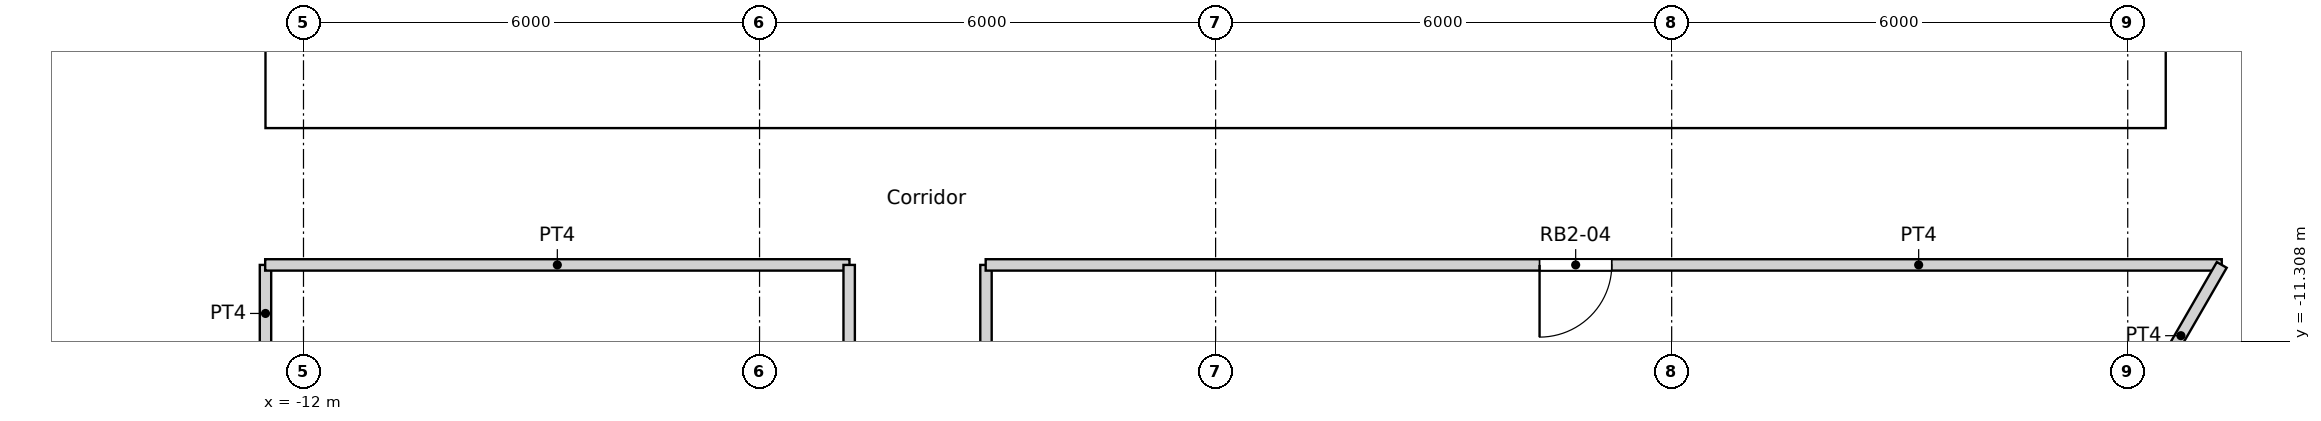
"""IFC4 building model, lengths in metres.
Left out: names, types, materials, properties, quantities, classifications, styles, units other than length and angle.
Written with IfcOpenShell. Run it as: python <this file> out.ifc"""

import sys

from ifc_helpers import new_model, si_unit, direction, frame, frame_2d, origin, place, context, subcontext, project, spatial, rectangle, extrude, element, fill, save


model = new_model("IFC4")
c1 = context("Model", 3, precision=1e-05, world=origin(), true_north=direction((0.0, 1.0)))
c2 = subcontext(c1, "Body", "Model", "MODEL_VIEW")
j1 = project(units=[si_unit("LENGTHUNIT", "METRE"), si_unit("PLANEANGLEUNIT", "RADIAN")], contexts=[c1])
p1 = place(None, origin())
s1 = spatial("IfcSite", under=j1, at=p1, CompositionType="ELEMENT")
p2 = place(p1, origin())
s2 = spatial("IfcBuilding", under=s1, at=p2, CompositionType="ELEMENT")
p3 = place(p2, frame((0.0, 0.0, 136.8)))
s3 = spatial("IfcBuildingStorey", under=s2, at=p3, CompositionType="ELEMENT", Elevation=136.8)
p4 = place(p3, frame((-12.5, -8.05, 0.0), z_axis=(0.0, 0.0, 1.0), x_axis=(1.0, 0.0, 0.0)))
e1 = element("IfcWall", 1, at=p4, inside=s3, PredefinedType="SOLIDWALL", context=c2, shape_type="SweptSolid", body=[
    extrude(rectangle(XDim=25.0, YDim=0.9, at=frame_2d((12.5, 0.0))), origin(), (0.0, 0.0, 1.0), 3.6),
])
p5 = place(p4, frame((13.4, 0.0, 0.0)))
e2 = element("IfcOpeningElement", 2, at=p5, cuts=e1, PredefinedType="OPENING", context=c2, shape_type="SweptSolid", body=[
    extrude(rectangle(XDim=1.0, YDim=2.1, at=frame_2d((0.5, 1.05))), frame((0.0, 0.45, 0.0), z_axis=(0.0, -1.0, 0.0), x_axis=(1.0, 0.0, 0.0)), (0.0, 0.0, 1.0), 0.9),
])
p6 = place(p4, frame((8.3, 0.0, 0.0)))
e3 = element("IfcOpeningElement", 3, at=p6, cuts=e1, PredefinedType="OPENING", context=c2, shape_type="SweptSolid", body=[
    extrude(rectangle(XDim=1.8, YDim=2.1, at=frame_2d((0.9, 1.05))), frame((0.0, 0.45, 0.0), z_axis=(0.0, -1.0, 0.0), x_axis=(1.0, 0.0, 0.0)), (0.0, 0.0, 1.0), 0.9),
])
p7 = place(p4, frame((14.9, 0.0, 0.0)))
e4 = element("IfcOpeningElement", 4, at=p7, cuts=e1, PredefinedType="OPENING", context=c2, shape_type="SweptSolid", body=[
    extrude(rectangle(XDim=1.8, YDim=2.1, at=frame_2d((0.9, 1.05))), frame((0.0, 0.45, 0.0), z_axis=(0.0, -1.0, 0.0), x_axis=(1.0, 0.0, 0.0)), (0.0, 0.0, 1.0), 0.9),
])
p8 = place(p3, frame((-12.05, -7.6, 0.0), z_axis=(0.0, 0.0, 1.0), x_axis=(0.0, 1.0, 0.0)))
e5 = element("IfcWall", 5, at=p8, inside=s3, PredefinedType="SOLIDWALL", context=c2, shape_type="SweptSolid", body=[
    extrude(rectangle(XDim=15.2, YDim=0.9, at=frame_2d((7.6, 0.0))), origin(), (0.0, 0.0, 1.0), 3.6),
])
p9 = place(p8, frame((7.1, 0.0, 0.0)))
e6 = element("IfcOpeningElement", 6, at=p9, cuts=e5, PredefinedType="OPENING", context=c2, shape_type="SweptSolid", body=[
    extrude(rectangle(XDim=1.0, YDim=2.1, at=frame_2d((0.5, 1.05))), frame((0.0, 0.45, 0.0), z_axis=(0.0, -1.0, 0.0), x_axis=(1.0, 0.0, 0.0)), (0.0, 0.0, 1.0), 0.9),
])
p10 = place(p3, frame((12.05, -7.6, 0.0), z_axis=(0.0, 0.0, 1.0), x_axis=(0.0, 1.0, 0.0)))
e7 = element("IfcWall", 7, at=p10, inside=s3, PredefinedType="SOLIDWALL", context=c2, shape_type="SweptSolid", body=[
    extrude(rectangle(XDim=15.2, YDim=0.9, at=frame_2d((7.6, 0.0))), origin(), (0.0, 0.0, 1.0), 3.6),
])
p11 = place(p10, frame((5.1, 0.0, 0.0)))
e8 = element("IfcOpeningElement", 8, at=p11, cuts=e7, PredefinedType="OPENING", context=c2, shape_type="SweptSolid", body=[
    extrude(rectangle(XDim=1.0, YDim=2.1, at=frame_2d((0.5, 1.05))), frame((0.0, 0.45, 0.0), z_axis=(0.0, -1.0, 0.0), x_axis=(1.0, 0.0, 0.0)), (0.0, 0.0, 1.0), 0.9),
])
for number, where, z_axis, x_axis in (
    (9, (0.55, -7.6, 0.0), (0.0, 0.0, 1.0), (0.0, 1.0, 0.0)),
    (10, (2.25, -7.6, 0.0), (0.0, 0.0, 1.0), (0.0, 1.0, 0.0)),
):
    element("IfcWall", number, at=place(p3, frame(where, z_axis=z_axis, x_axis=x_axis)), inside=s3, PredefinedType="SOLIDWALL", context=c2, shape_type="SweptSolid", body=[
        extrude(rectangle(XDim=4.35, YDim=0.3, at=frame_2d((2.175, 0.0))), origin(), (0.0, 0.0, 1.0), 3.3),
    ])
p12 = place(p3, frame((-9.05, -7.15, 0.0), z_axis=(0.0, 0.0, 1.0), x_axis=(1.0, 0.0, 0.0)))
e11 = element("IfcWall", 11, at=p12, inside=s3, PredefinedType="SOLIDWALL", context=c2, shape_type="SweptSolid", body=[
    extrude(rectangle(XDim=4.85, YDim=0.9, at=frame_2d((2.425, 0.0))), origin(), (0.0, 0.0, 1.0), 3.3),
])
p13 = place(p3, frame((-2.4, -7.15, 0.0), z_axis=(0.0, 0.0, 1.0), x_axis=(1.0, 0.0, 0.0)))
e12 = element("IfcWall", 12, at=p13, inside=s3, PredefinedType="SOLIDWALL", context=c2, shape_type="SweptSolid", body=[
    extrude(rectangle(XDim=2.8, YDim=0.9, at=frame_2d((1.4, 0.0))), origin(), (0.0, 0.0, 1.0), 3.3),
])
p14 = place(p3, frame((4.2, -7.15, 0.0), z_axis=(0.0, 0.0, 1.0), x_axis=(1.0, 0.0, 0.0)))
e13 = element("IfcWall", 13, at=p14, inside=s3, PredefinedType="SOLIDWALL", context=c2, shape_type="SweptSolid", body=[
    extrude(rectangle(XDim=4.85, YDim=0.9, at=frame_2d((2.425, 0.0))), origin(), (0.0, 0.0, 1.0), 3.3),
])
p15 = place(p3, frame((-12.504, -10.3, 0.0), z_axis=(0.0, 0.0, 1.0), x_axis=(1.0, 0.0, 0.0)))
e14 = element("IfcWall", 14, at=p15, inside=s3, PredefinedType="PARTITIONING", context=c2, shape_type="SweptSolid", body=[
    extrude(rectangle(XDim=7.687, YDim=0.15, at=frame_2d((3.844, 0.0))), origin(), (0.0, 0.0, 1.0), 3.3),
])
p16 = place(p3, frame((-3.025, -10.3, 0.0), z_axis=(0.0, 0.0, 1.0), x_axis=(1.0, 0.0, 0.0)))
e15 = element("IfcWall", 15, at=p16, inside=s3, PredefinedType="PARTITIONING", context=c2, shape_type="SweptSolid", body=[
    extrude(rectangle(XDim=16.262, YDim=0.15, at=frame_2d((8.131, 0.0))), origin(), (0.0, 0.0, 1.0), 3.3),
])
p17 = place(p16, frame((7.287, 0.0, 0.0)))
e16 = element("IfcOpeningElement", 16, at=p17, cuts=e15, PredefinedType="OPENING", context=c2, shape_type="SweptSolid", body=[
    extrude(rectangle(XDim=0.95, YDim=2.1, at=frame_2d((0.475, 1.05))), frame((0.0, 0.075, 0.0), z_axis=(0.0, -1.0, 0.0), x_axis=(1.0, 0.0, 0.0)), (0.0, 0.0, 1.0), 0.15),
])
p18 = place(p3, frame((12.162, -12.162, 0.0), z_axis=(0.0, 0.0, 1.0), x_axis=(0.499961633463, 0.866047553582, 0.0)))
e17 = element("IfcWall", 17, at=p18, inside=s3, PredefinedType="PARTITIONING", context=c2, shape_type="SweptSolid", body=[
    extrude(rectangle(XDim=2.15, YDim=0.15, at=frame_2d((1.075, 0.0))), origin(), (0.0, 0.0, 1.0), 3.3),
])
p19 = place(p3, frame((-12.5, -11.577, 0.0), z_axis=(0.0, 0.0, 1.0), x_axis=(0.0, 1.0, 0.0)))
e18 = element("IfcWall", 18, at=p19, inside=s3, PredefinedType="PARTITIONING", context=c2, shape_type="SweptSolid", body=[
    extrude(rectangle(XDim=1.277, YDim=0.15, at=frame_2d((0.638, 0.0))), origin(), (0.0, 0.0, 1.0), 3.3),
])
p20 = place(p3, frame((-18.688, -6.802, 0.0), z_axis=(0.0, 0.0, 1.0), x_axis=(0.499914202267, -0.866074933462, 0.0)))
e19 = element("IfcWall", 19, at=p20, inside=s3, PredefinedType="PARTITIONING", context=c2, shape_type="SweptSolid", body=[
    extrude(rectangle(XDim=6.907, YDim=0.15, at=frame_2d((3.454, 0.0))), origin(), (0.0, 0.0, 1.0), 3.3),
])
p21 = place(p20, frame((3.003, 0.0, 0.0)))
e20 = element("IfcOpeningElement", 20, at=p21, cuts=e19, PredefinedType="OPENING", context=c2, shape_type="SweptSolid", body=[
    extrude(rectangle(XDim=1.8, YDim=2.1, at=frame_2d((0.9, 1.05))), frame((0.0, 0.075, 0.0), z_axis=(0.0, -1.0, 0.0), x_axis=(1.0, 0.0, 0.0)), (0.0, 0.0, 1.0), 0.15),
])
p22 = place(p3, frame((-4.821, -16.401, 0.0), z_axis=(0.0, 0.0, 1.0), x_axis=(0.0, 1.0, 0.0)))
e21 = element("IfcWall", 21, at=p22, inside=s3, PredefinedType="PARTITIONING", context=c2, shape_type="SweptSolid", body=[
    extrude(rectangle(XDim=6.101, YDim=0.15, at=frame_2d((3.05, 0.0))), origin(), (0.0, 0.0, 1.0), 3.3),
])
p23 = place(p3, frame((-3.021, -16.614, 0.0), z_axis=(0.0, 0.0, 1.0), x_axis=(0.0, 1.0, 0.0)))
e22 = element("IfcWall", 22, at=p23, inside=s3, PredefinedType="PARTITIONING", context=c2, shape_type="SweptSolid", body=[
    extrude(rectangle(XDim=6.314, YDim=0.15, at=frame_2d((3.157, 0.0))), origin(), (0.0, 0.0, 1.0), 3.3),
])
p24 = place(p5, origin())
e23 = element("IfcDoor", 23, at=p24, inside=s3, OperationType="SINGLE_SWING_LEFT", PredefinedType="DOOR", context=c2, shape_type="SweptSolid", body=[
    extrude(rectangle(XDim=1.0, YDim=2.1, at=frame_2d((0.5, 1.05))), frame((0.0, 0.025, 0.0), z_axis=(0.0, -1.0, 0.0), x_axis=(1.0, 0.0, 0.0)), (0.0, 0.0, 1.0), 0.05),
])
fill(e2, e23)
p25 = place(p6, origin())
e24 = element("IfcDoor", 24, at=p25, inside=s3, OperationType="DOUBLE_DOOR_SINGLE_SWING", PredefinedType="DOOR", context=c2, shape_type="SweptSolid", body=[
    extrude(rectangle(XDim=1.8, YDim=2.1, at=frame_2d((0.9, 1.05))), frame((0.0, 0.025, 0.0), z_axis=(0.0, -1.0, 0.0), x_axis=(1.0, 0.0, 0.0)), (0.0, 0.0, 1.0), 0.05),
])
fill(e3, e24)
p26 = place(p7, origin())
e25 = element("IfcDoor", 25, at=p26, inside=s3, OperationType="DOUBLE_DOOR_SINGLE_SWING", PredefinedType="DOOR", context=c2, shape_type="SweptSolid", body=[
    extrude(rectangle(XDim=1.8, YDim=2.1, at=frame_2d((0.9, 1.05))), frame((0.0, 0.025, 0.0), z_axis=(0.0, -1.0, 0.0), x_axis=(1.0, 0.0, 0.0)), (0.0, 0.0, 1.0), 0.05),
])
fill(e4, e25)
p27 = place(p17, origin())
e26 = element("IfcDoor", 26, at=p27, inside=s3, OperationType="SINGLE_SWING_RIGHT", PredefinedType="DOOR", context=c2, shape_type="SweptSolid", body=[
    extrude(rectangle(XDim=0.95, YDim=2.1, at=frame_2d((0.475, 1.05))), frame((0.0, 0.025, 0.0), z_axis=(0.0, -1.0, 0.0), x_axis=(1.0, 0.0, 0.0)), (0.0, 0.0, 1.0), 0.05),
])
fill(e16, e26)
save(model, sys.argv[1])
